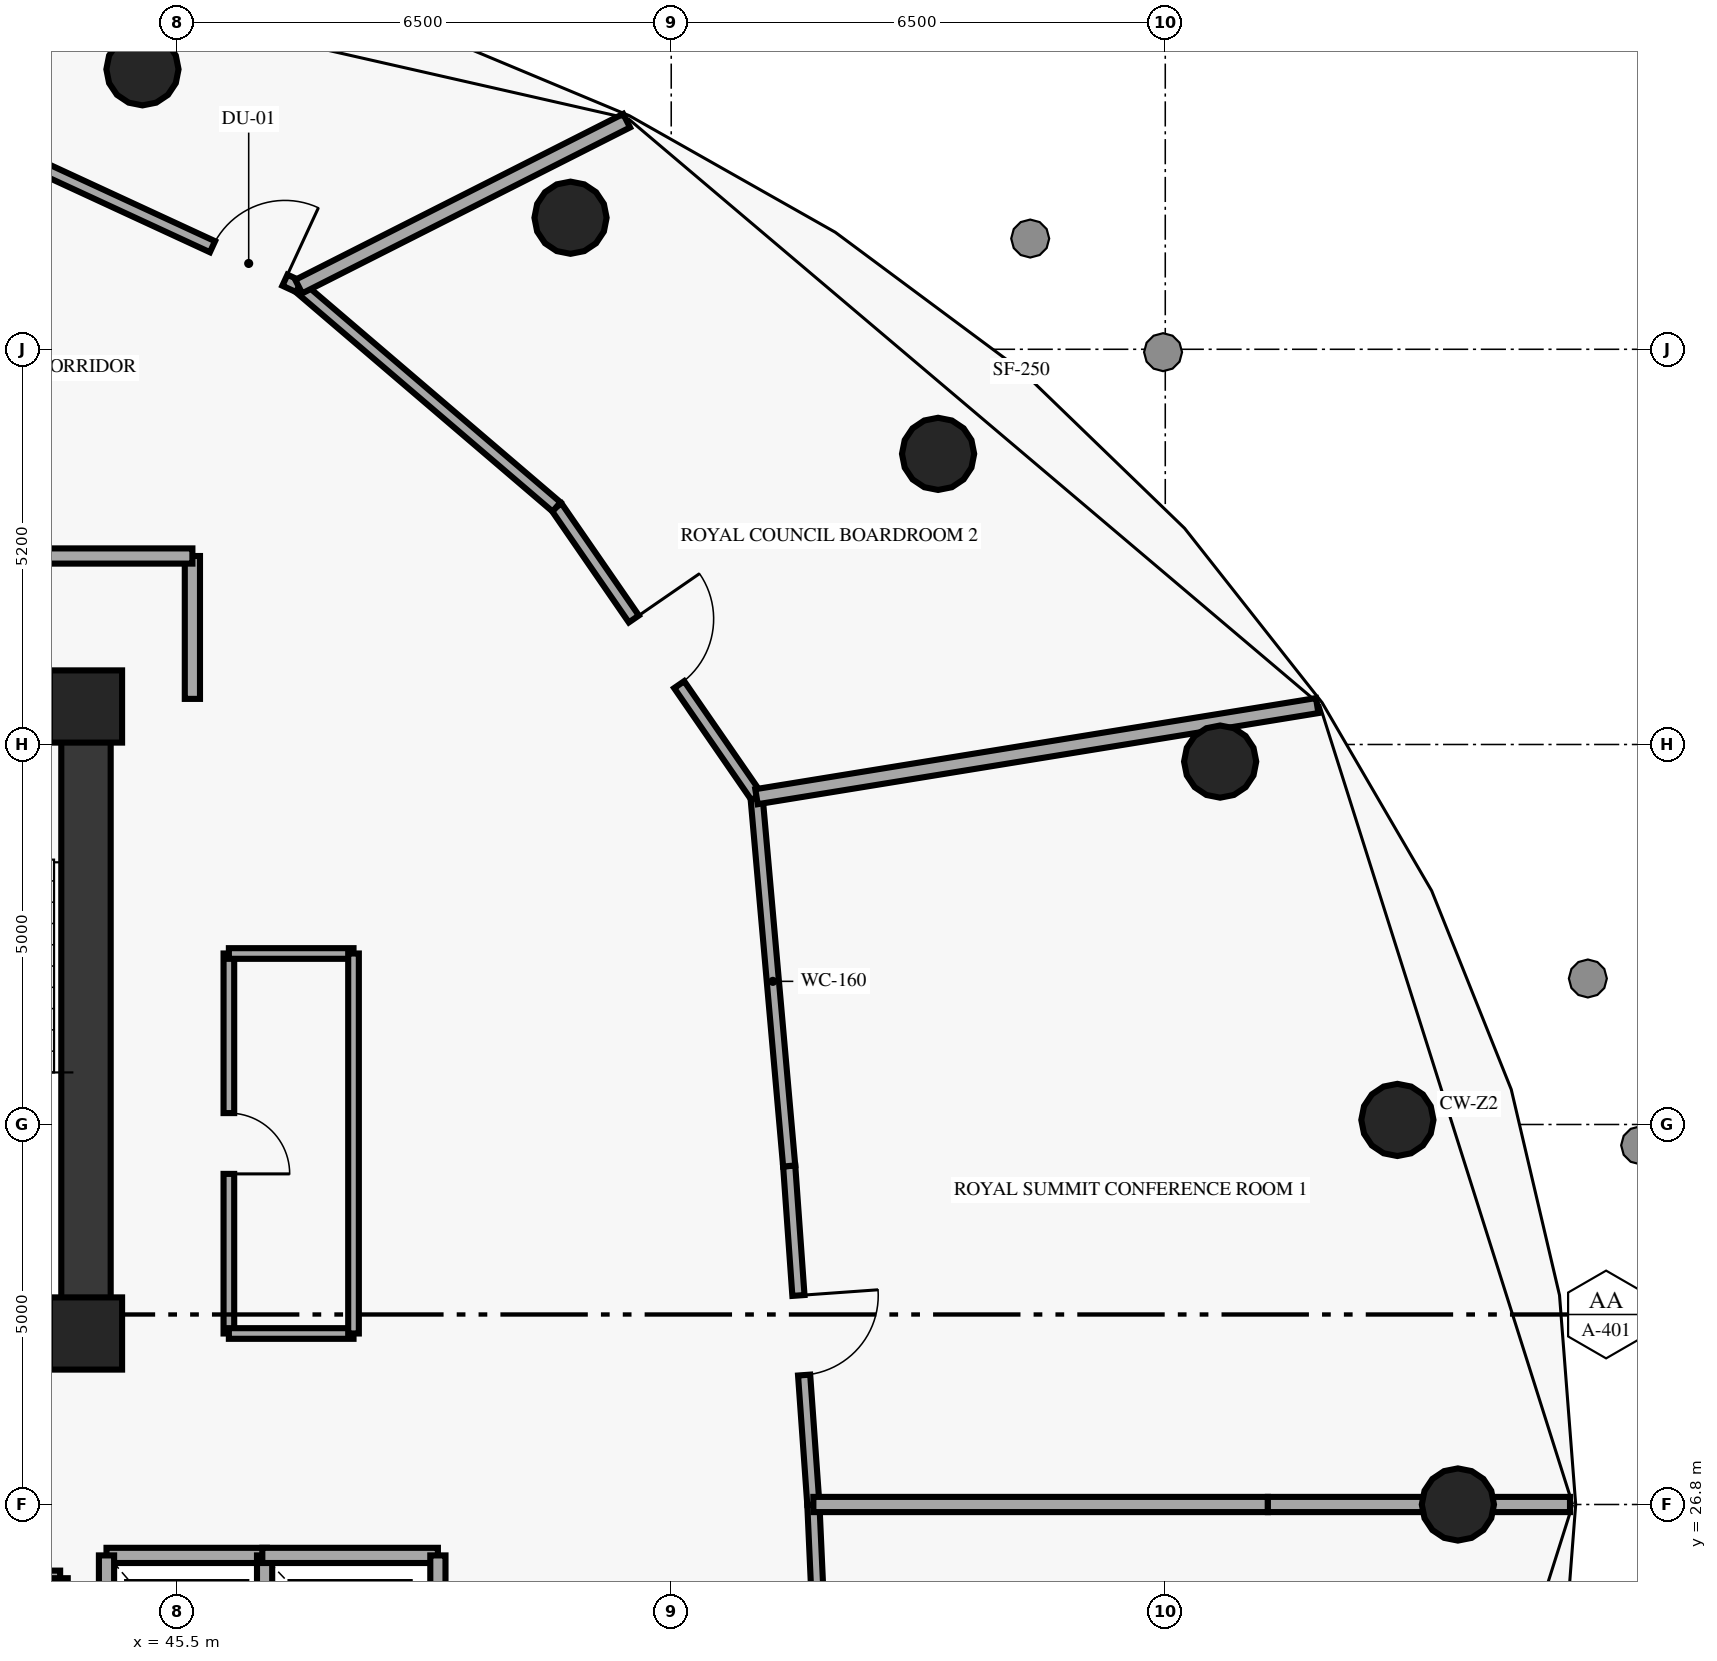
"""IFC4 building model, lengths in metres.
Left out: names, types, materials, properties, quantities, classifications, styles, units other than length and angle.
Written with IfcOpenShell. Run it as: python <this file> out.ifc"""

import sys

from ifc_helpers import new_model, si_unit, direction, frame, frame_2d, origin, origin_2d, place, context, subcontext, project, spatial, rectangle, circle, extrude, element, fill, save


model = new_model("IFC4")
c1 = context("Model", 3, precision=1e-05, world=origin(), true_north=direction((0.0, 1.0)))
c2 = subcontext(c1, "Body", "Model", "MODEL_VIEW")
j1 = project(units=[si_unit("LENGTHUNIT", "METRE"), si_unit("PLANEANGLEUNIT", "RADIAN")], contexts=[c1])
p1 = place(None, origin())
s1 = spatial("IfcSite", under=j1, at=p1, CompositionType="ELEMENT")
p2 = place(p1, origin())
s2 = spatial("IfcBuilding", under=s1, at=p2, CompositionType="ELEMENT")
p3 = place(p2, frame((0.0, 0.0, 192.25)))
s3 = spatial("IfcBuildingStorey", under=s2, at=p3, CompositionType="ELEMENT", Elevation=192.25)
for number, where, z_axis, x_axis in (
    (1, (44.3, 29.05, 0.0), (0.0, 0.0, 1.0), (1.0, 0.0, 0.0)),
    (2, (44.3, 37.3, 0.0), (0.0, 0.0, 1.0), (1.0, 0.0, 0.0)),
):
    element("IfcColumn", number, at=place(p3, frame(where, z_axis=z_axis, x_axis=x_axis)), inside=s3, PredefinedType="PILASTER", context=c2, shape_type="SweptSolid", body=[
        extrude(rectangle(XDim=0.95, YDim=0.95, at=origin_2d()), origin(), (0.0, 0.0, 1.0), 3.35),
    ])
for number, where, z_axis, x_axis in (
    (3, (62.35, 26.8, 0.0), (0.0, 0.0, 1.0), (1.0, 0.0, 0.0)),
    (4, (61.554, 31.86, 0.0), (0.0, 0.0, 1.0), (1.0, 0.0, 0.0)),
    (5, (59.222, 36.575, 0.0), (0.0, 0.0, 1.0), (1.0, 0.0, 0.0)),
    (6, (55.511, 40.624, 0.0), (0.0, 0.0, 1.0), (1.0, 0.0, 0.0)),
    (7, (50.675, 43.731, 0.0), (0.0, 0.0, 1.0), (1.0, 0.0, 0.0)),
    (8, (45.043, 45.684, 0.0), (0.0, 0.0, 1.0), (1.0, 0.0, 0.0)),
):
    element("IfcColumn", number, at=place(p3, frame(where, z_axis=z_axis, x_axis=x_axis)), inside=s3, PredefinedType="COLUMN", context=c2, shape_type="SweptSolid", body=[
        extrude(circle(Radius=0.475, at=origin_2d()), origin(), (0.0, 0.0, 1.0), 3.35),
    ])
p4 = place(p3, frame((44.3, 29.05, 0.0), z_axis=(0.0, 0.0, 1.0), x_axis=(0.0, 1.0, 0.0)))
e9 = element("IfcWall", 9, at=p4, inside=s3, PredefinedType="SHEAR", context=c2, shape_type="SweptSolid", body=[
    extrude(rectangle(XDim=8.35, YDim=0.65, at=frame_2d((4.175, 0.0))), origin(), (0.0, 0.0, 1.0), 3.35),
])
p5 = place(p3, frame((33.7, 29.05, 0.0), z_axis=(0.0, 0.0, 1.0), x_axis=(1.0, 0.0, 0.0)))
e10 = element("IfcWall", 10, at=p5, inside=s3, PredefinedType="SHEAR", context=c2, shape_type="SweptSolid", body=[
    extrude(rectangle(XDim=10.6, YDim=0.65, at=frame_2d((5.3, 0.0))), origin(), (0.0, 0.0, 1.0), 3.35),
])
p6 = place(p3, frame((44.3, 37.4, 0.0), z_axis=(0.0, 0.0, 1.0), x_axis=(-1.0, 0.0, 0.0)))
e11 = element("IfcWall", 11, at=p6, inside=s3, PredefinedType="SHEAR", context=c2, shape_type="SweptSolid", body=[
    extrude(rectangle(XDim=3.65, YDim=0.45, at=frame_2d((1.825, 0.0))), origin(), (0.0, 0.0, 1.0), 3.35),
])
p7 = place(p6, frame((1.25, 0.0, 0.0)))
e12 = element("IfcOpeningElement", 12, at=p7, cuts=e11, PredefinedType="OPENING", context=c2, shape_type="SweptSolid", body=[
    extrude(rectangle(XDim=1.15, YDim=2.15, at=frame_2d((0.575, 1.075))), frame((0.0, 0.235, 0.0), z_axis=(0.0, -1.0, 0.0), x_axis=(1.0, 0.0, 0.0)), (0.0, 0.0, 1.0), 0.47),
])
p8 = place(p3, frame((45.7, 37.4, 0.0), z_axis=(0.0, 0.0, 1.0), x_axis=(0.0, 1.0, 0.0)))
e13 = element("IfcWall", 13, at=p8, inside=s3, PredefinedType="SOLIDWALL", context=c2, shape_type="SweptSolid", body=[
    extrude(rectangle(XDim=1.88, YDim=0.2, at=frame_2d((0.94, 0.0))), origin(), (0.0, 0.0, 1.0), 3.35),
])
p9 = place(p3, frame((45.7, 39.28, 0.0), z_axis=(0.0, 0.0, 1.0), x_axis=(-1.0, 0.0, 0.0)))
e14 = element("IfcWall", 14, at=p9, inside=s3, PredefinedType="SOLIDWALL", context=c2, shape_type="SweptSolid", body=[
    extrude(rectangle(XDim=6.6, YDim=0.2, at=frame_2d((3.3, 0.0))), origin(), (0.0, 0.0, 1.0), 3.35),
])
p10 = place(p9, frame((4.35, 0.0, 0.0)))
e15 = element("IfcOpeningElement", 15, at=p10, cuts=e14, PredefinedType="OPENING", context=c2, shape_type="SweptSolid", body=[
    extrude(rectangle(XDim=1.6, YDim=2.2, at=frame_2d((0.8, 1.1))), frame((0.0, 0.11, 0.0), z_axis=(0.0, -1.0, 0.0), x_axis=(1.0, 0.0, 0.0)), (0.0, 0.0, 1.0), 0.22),
])
p11 = place(p3, frame((44.57, 26.13, 0.0), z_axis=(0.0, 0.0, 1.0), x_axis=(1.0, 0.0, 0.0)))
e16 = element("IfcWall", 16, at=p11, inside=s3, PredefinedType="SOLIDWALL", context=c2, shape_type="SweptSolid", body=[
    extrude(rectangle(XDim=2.11, YDim=0.2, at=frame_2d((1.055, 0.0))), origin(), (0.0, 0.0, 1.0), 3.35),
])
for number, where, z_axis, x_axis in (
    (17, (44.57, 23.72, 0.0), (0.0, 0.0, 1.0), (0.0, 1.0, 0.0)),
    (18, (46.65, 23.72, 0.0), (0.0, 0.0, 1.0), (0.0, 1.0, 0.0)),
):
    element("IfcWall", number, at=place(p3, frame(where, z_axis=z_axis, x_axis=x_axis)), inside=s3, PredefinedType="SOLIDWALL", context=c2, shape_type="SweptSolid", body=[
        extrude(rectangle(XDim=2.41, YDim=0.2, at=frame_2d((1.205, 0.0))), origin(), (0.0, 0.0, 1.0), 3.35),
    ])
p12 = place(p3, frame((46.62, 26.13, 0.0), z_axis=(0.0, 0.0, 1.0), x_axis=(1.0, 0.0, 0.0)))
e19 = element("IfcWall", 19, at=p12, inside=s3, PredefinedType="SOLIDWALL", context=c2, shape_type="SweptSolid", body=[
    extrude(rectangle(XDim=2.31, YDim=0.2, at=frame_2d((1.155, 0.0))), origin(), (0.0, 0.0, 1.0), 3.35),
])
p13 = place(p3, frame((48.93, 23.72, 0.0), z_axis=(0.0, 0.0, 1.0), x_axis=(0.0, 1.0, 0.0)))
e20 = element("IfcWall", 20, at=p13, inside=s3, PredefinedType="SOLIDWALL", context=c2, shape_type="SweptSolid", body=[
    extrude(rectangle(XDim=2.41, YDim=0.2, at=frame_2d((1.205, 0.0))), origin(), (0.0, 0.0, 1.0), 3.35),
])
p14 = place(p3, frame((41.46, 25.83, 0.0), z_axis=(0.0, 0.0, 1.0), x_axis=(1.0, 0.0, 0.0)))
e21 = element("IfcWall", 21, at=p14, inside=s3, PredefinedType="SOLIDWALL", context=c2, shape_type="SweptSolid", body=[
    extrude(rectangle(XDim=2.5, YDim=0.2, at=frame_2d((1.25, 0.0))), origin(), (0.0, 0.0, 1.0), 3.35),
])
p15 = place(p3, frame((43.96, 23.42, 0.0), z_axis=(0.0, 0.0, 1.0), x_axis=(0.0, 1.0, 0.0)))
e22 = element("IfcWall", 22, at=p15, inside=s3, PredefinedType="SOLIDWALL", context=c2, shape_type="SweptSolid", body=[
    extrude(rectangle(XDim=2.41, YDim=0.2, at=frame_2d((1.205, 0.0))), origin(), (0.0, 0.0, 1.0), 3.35),
])
p16 = place(p3, frame((46.18, 34.05, 0.0), z_axis=(0.0, 0.0, 1.0), x_axis=(0.0, -1.0, 0.0)))
e23 = element("IfcWall", 23, at=p16, inside=s3, PredefinedType="PARTITIONING", context=c2, shape_type="SweptSolid", body=[
    extrude(rectangle(XDim=5.0, YDim=0.14, at=frame_2d((2.5, 0.0))), origin(), (0.0, 0.0, 1.0), 3.35),
])
p17 = place(p16, frame((2.1, 0.0, 0.0)))
e24 = element("IfcOpeningElement", 24, at=p17, cuts=e23, PredefinedType="OPENING", context=c2, shape_type="SweptSolid", body=[
    extrude(rectangle(XDim=0.8, YDim=2.05, at=frame_2d((0.4, 1.025))), frame((0.0, 0.08, 0.0), z_axis=(0.0, -1.0, 0.0), x_axis=(1.0, 0.0, 0.0)), (0.0, 0.0, 1.0), 0.16),
])
for number, where, z_axis, x_axis in (
    (25, (46.18, 29.05, 0.0), (0.0, 0.0, 1.0), (1.0, 0.0, 0.0)),
    (26, (46.18, 34.05, 0.0), (0.0, 0.0, 1.0), (1.0, 0.0, 0.0)),
):
    element("IfcWall", number, at=place(p3, frame(where, z_axis=z_axis, x_axis=x_axis)), inside=s3, PredefinedType="PARTITIONING", context=c2, shape_type="SweptSolid", body=[
        extrude(rectangle(XDim=1.64, YDim=0.14, at=frame_2d((0.82, 0.0))), origin(), (0.0, 0.0, 1.0), 3.35),
    ])
p18 = place(p3, frame((47.82, 29.05, 0.0), z_axis=(0.0, 0.0, 1.0), x_axis=(0.0, 1.0, 0.0)))
e27 = element("IfcWall", 27, at=p18, inside=s3, PredefinedType="PARTITIONING", context=c2, shape_type="SweptSolid", body=[
    extrude(rectangle(XDim=5.0, YDim=0.14, at=frame_2d((2.5, 0.0))), origin(), (0.0, 0.0, 1.0), 3.35),
])
p19 = place(p3, frame((54.078, 22.185, 0.0), z_axis=(0.0, 0.0, 1.0), x_axis=(-0.044973757158, 0.998988168682, 0.0)))
e28 = element("IfcWall", 28, at=p19, inside=s3, PredefinedType="PARTITIONING", context=c2, shape_type="SweptSolid", body=[
    extrude(rectangle(XDim=4.62, YDim=0.16, at=frame_2d((2.31, 0.0))), origin(), (0.0, 0.0, 1.0), 3.35),
])
p20 = place(p3, frame((53.552, 31.254, 0.0), z_axis=(0.0, 0.0, 1.0), x_axis=(0.071243164365, -0.997458977368, 0.0)))
e29 = element("IfcWall", 29, at=p20, inside=s3, PredefinedType="PARTITIONING", context=c2, shape_type="SweptSolid", body=[
    extrude(rectangle(XDim=4.465, YDim=0.16, at=frame_2d((2.232, 0.0))), origin(), (0.0, 0.0, 1.0), 3.35),
])
p21 = place(p20, frame((1.708, 0.0, 0.0)))
e30 = element("IfcOpeningElement", 30, at=p21, cuts=e29, PredefinedType="OPENING", context=c2, shape_type="SweptSolid", body=[
    extrude(rectangle(XDim=1.05, YDim=2.15, at=frame_2d((0.525, 1.075))), frame((0.0, 0.09, 0.0), z_axis=(0.0, -1.0, 0.0), x_axis=(1.0, 0.0, 0.0)), (0.0, 0.0, 1.0), 0.18),
])
p22 = place(p3, frame((53.552, 31.254, 0.0), z_axis=(0.0, 0.0, 1.0), x_axis=(-0.088134812175, 0.996108555772, 0.0)))
e31 = element("IfcWall", 31, at=p22, inside=s3, PredefinedType="PARTITIONING", context=c2, shape_type="SweptSolid", body=[
    extrude(rectangle(XDim=4.878, YDim=0.16, at=frame_2d((2.439, 0.0))), origin(), (0.0, 0.0, 1.0), 3.35),
])
p23 = place(p3, frame((50.491, 39.926, 0.0), z_axis=(0.0, 0.0, 1.0), x_axis=(0.567945986758, -0.823065827334, 0.0)))
e32 = element("IfcWall", 32, at=p23, inside=s3, PredefinedType="PARTITIONING", context=c2, shape_type="SweptSolid", body=[
    extrude(rectangle(XDim=4.633, YDim=0.16, at=frame_2d((2.316, 0.0))), origin(), (0.0, 0.0, 1.0), 3.35),
])
p24 = place(p23, frame((1.791, 0.0, 0.0)))
e33 = element("IfcOpeningElement", 33, at=p24, cuts=e32, PredefinedType="OPENING", context=c2, shape_type="SweptSolid", body=[
    extrude(rectangle(XDim=1.05, YDim=2.15, at=frame_2d((0.525, 1.075))), frame((0.0, 0.09, 0.0), z_axis=(0.0, -1.0, 0.0), x_axis=(1.0, 0.0, 0.0)), (0.0, 0.0, 1.0), 0.18),
])
p25 = place(p3, frame((50.491, 39.926, 0.0), z_axis=(0.0, 0.0, 1.0), x_axis=(-0.760182801929, 0.64970924855, 0.0)))
e34 = element("IfcWall", 34, at=p25, inside=s3, PredefinedType="PARTITIONING", context=c2, shape_type="SweptSolid", body=[
    extrude(rectangle(XDim=4.462, YDim=0.16, at=frame_2d((2.231, 0.0))), origin(), (0.0, 0.0, 1.0), 3.35),
])
p26 = place(p3, frame((43.184, 44.635, 0.0), z_axis=(0.0, 0.0, 1.0), x_axis=(0.907684181703, -0.41965393634, 0.0)))
e35 = element("IfcWall", 35, at=p26, inside=s3, PredefinedType="PARTITIONING", context=c2, shape_type="SweptSolid", body=[
    extrude(rectangle(XDim=4.313, YDim=0.16, at=frame_2d((2.157, 0.0))), origin(), (0.0, 0.0, 1.0), 3.35),
])
p27 = place(p26, frame((3.063, 0.0, 0.0)))
e36 = element("IfcOpeningElement", 36, at=p27, cuts=e35, PredefinedType="OPENING", context=c2, shape_type="SweptSolid", body=[
    extrude(rectangle(XDim=1.05, YDim=2.15, at=frame_2d((0.525, 1.075))), frame((0.0, 0.09, 0.0), z_axis=(0.0, -1.0, 0.0), x_axis=(1.0, 0.0, 0.0)), (0.0, 0.0, 1.0), 0.18),
])
p28 = place(p3, frame((53.87, 26.8, 0.0), z_axis=(0.0, 0.0, 1.0), x_axis=(1.0, 0.0, 0.0)))
e37 = element("IfcWall", 37, at=p28, inside=s3, PredefinedType="PARTITIONING", context=c2, shape_type="SweptSolid", body=[
    extrude(rectangle(XDim=5.98, YDim=0.2, at=frame_2d((2.99, 0.0))), origin(), (0.0, 0.0, 1.0), 3.35),
])
p29 = place(p3, frame((59.85, 26.8, 0.0), z_axis=(0.0, 0.0, 1.0), x_axis=(1.0, 0.0, 0.0)))
e38 = element("IfcWall", 38, at=p29, inside=s3, PredefinedType="PARTITIONING", context=c2, shape_type="SweptSolid", body=[
    extrude(rectangle(XDim=2.512, YDim=0.2, at=frame_2d((1.256, 0.0))), origin(), (0.0, 0.0, 1.0), 2.31),
])
p30 = place(p3, frame((62.362, 26.8, 0.0), z_axis=(0.0, 0.0, 1.0), x_axis=(1.0, 0.0, 0.0)))
e39 = element("IfcWall", 39, at=p30, inside=s3, PredefinedType="PARTITIONING", context=c2, shape_type="SweptSolid", body=[
    extrude(rectangle(XDim=1.463, YDim=0.2, at=frame_2d((0.731, 0.0))), origin(), (0.0, 0.0, 1.0), 3.35),
])
p31 = place(p3, frame((53.122, 36.113, 0.0), z_axis=(0.0, 0.0, 1.0), x_axis=(0.987048079656, 0.160424712708, 0.0)))
e40 = element("IfcWall", 40, at=p31, inside=s3, PredefinedType="PARTITIONING", context=c2, shape_type="SweptSolid", body=[
    extrude(rectangle(XDim=7.474, YDim=0.2, at=frame_2d((3.737, 0.0))), origin(), (0.0, 0.0, 1.0), 3.35),
])
p32 = place(p3, frame((47.099, 42.825, 0.0), z_axis=(0.0, 0.0, 1.0), x_axis=(0.892255539141, 0.451530788398, 0.0)))
e41 = element("IfcWall", 41, at=p32, inside=s3, PredefinedType="PARTITIONING", context=c2, shape_type="SweptSolid", body=[
    extrude(rectangle(XDim=4.835, YDim=0.2, at=frame_2d((2.417, 0.0))), origin(), (0.0, 0.0, 1.0), 3.35),
])
p33 = place(p17, origin())
e42 = element("IfcDoor", 42, at=p33, inside=s3, OperationType="SINGLE_SWING_RIGHT", PredefinedType="DOOR", context=c2, shape_type="SweptSolid", body=[
    extrude(rectangle(XDim=0.8, YDim=2.05, at=frame_2d((0.4, 1.025))), frame((0.0, 0.025, 0.0), z_axis=(0.0, -1.0, 0.0), x_axis=(1.0, 0.0, 0.0)), (0.0, 0.0, 1.0), 0.05),
])
fill(e24, e42)
p34 = place(p21, origin())
e43 = element("IfcDoor", 43, at=p34, inside=s3, OperationType="SINGLE_SWING_LEFT", PredefinedType="DOOR", context=c2, shape_type="SweptSolid", body=[
    extrude(rectangle(XDim=1.05, YDim=2.15, at=frame_2d((0.525, 1.075))), frame((0.0, 0.025, 0.0), z_axis=(0.0, -1.0, 0.0), x_axis=(1.0, 0.0, 0.0)), (0.0, 0.0, 1.0), 0.05),
])
fill(e30, e43)
p35 = place(p24, origin())
e44 = element("IfcDoor", 44, at=p35, inside=s3, OperationType="SINGLE_SWING_LEFT", PredefinedType="DOOR", context=c2, shape_type="SweptSolid", body=[
    extrude(rectangle(XDim=1.05, YDim=2.15, at=frame_2d((0.525, 1.075))), frame((0.0, 0.025, 0.0), z_axis=(0.0, -1.0, 0.0), x_axis=(1.0, 0.0, 0.0)), (0.0, 0.0, 1.0), 0.05),
])
fill(e33, e44)
p36 = place(p27, origin())
e45 = element("IfcDoor", 45, at=p36, inside=s3, OperationType="SINGLE_SWING_RIGHT", PredefinedType="DOOR", context=c2, shape_type="SweptSolid", body=[
    extrude(rectangle(XDim=1.05, YDim=2.15, at=frame_2d((0.525, 1.075))), frame((0.0, 0.025, 0.0), z_axis=(0.0, -1.0, 0.0), x_axis=(1.0, 0.0, 0.0)), (0.0, 0.0, 1.0), 0.05),
])
fill(e36, e45)
save(model, sys.argv[1])
